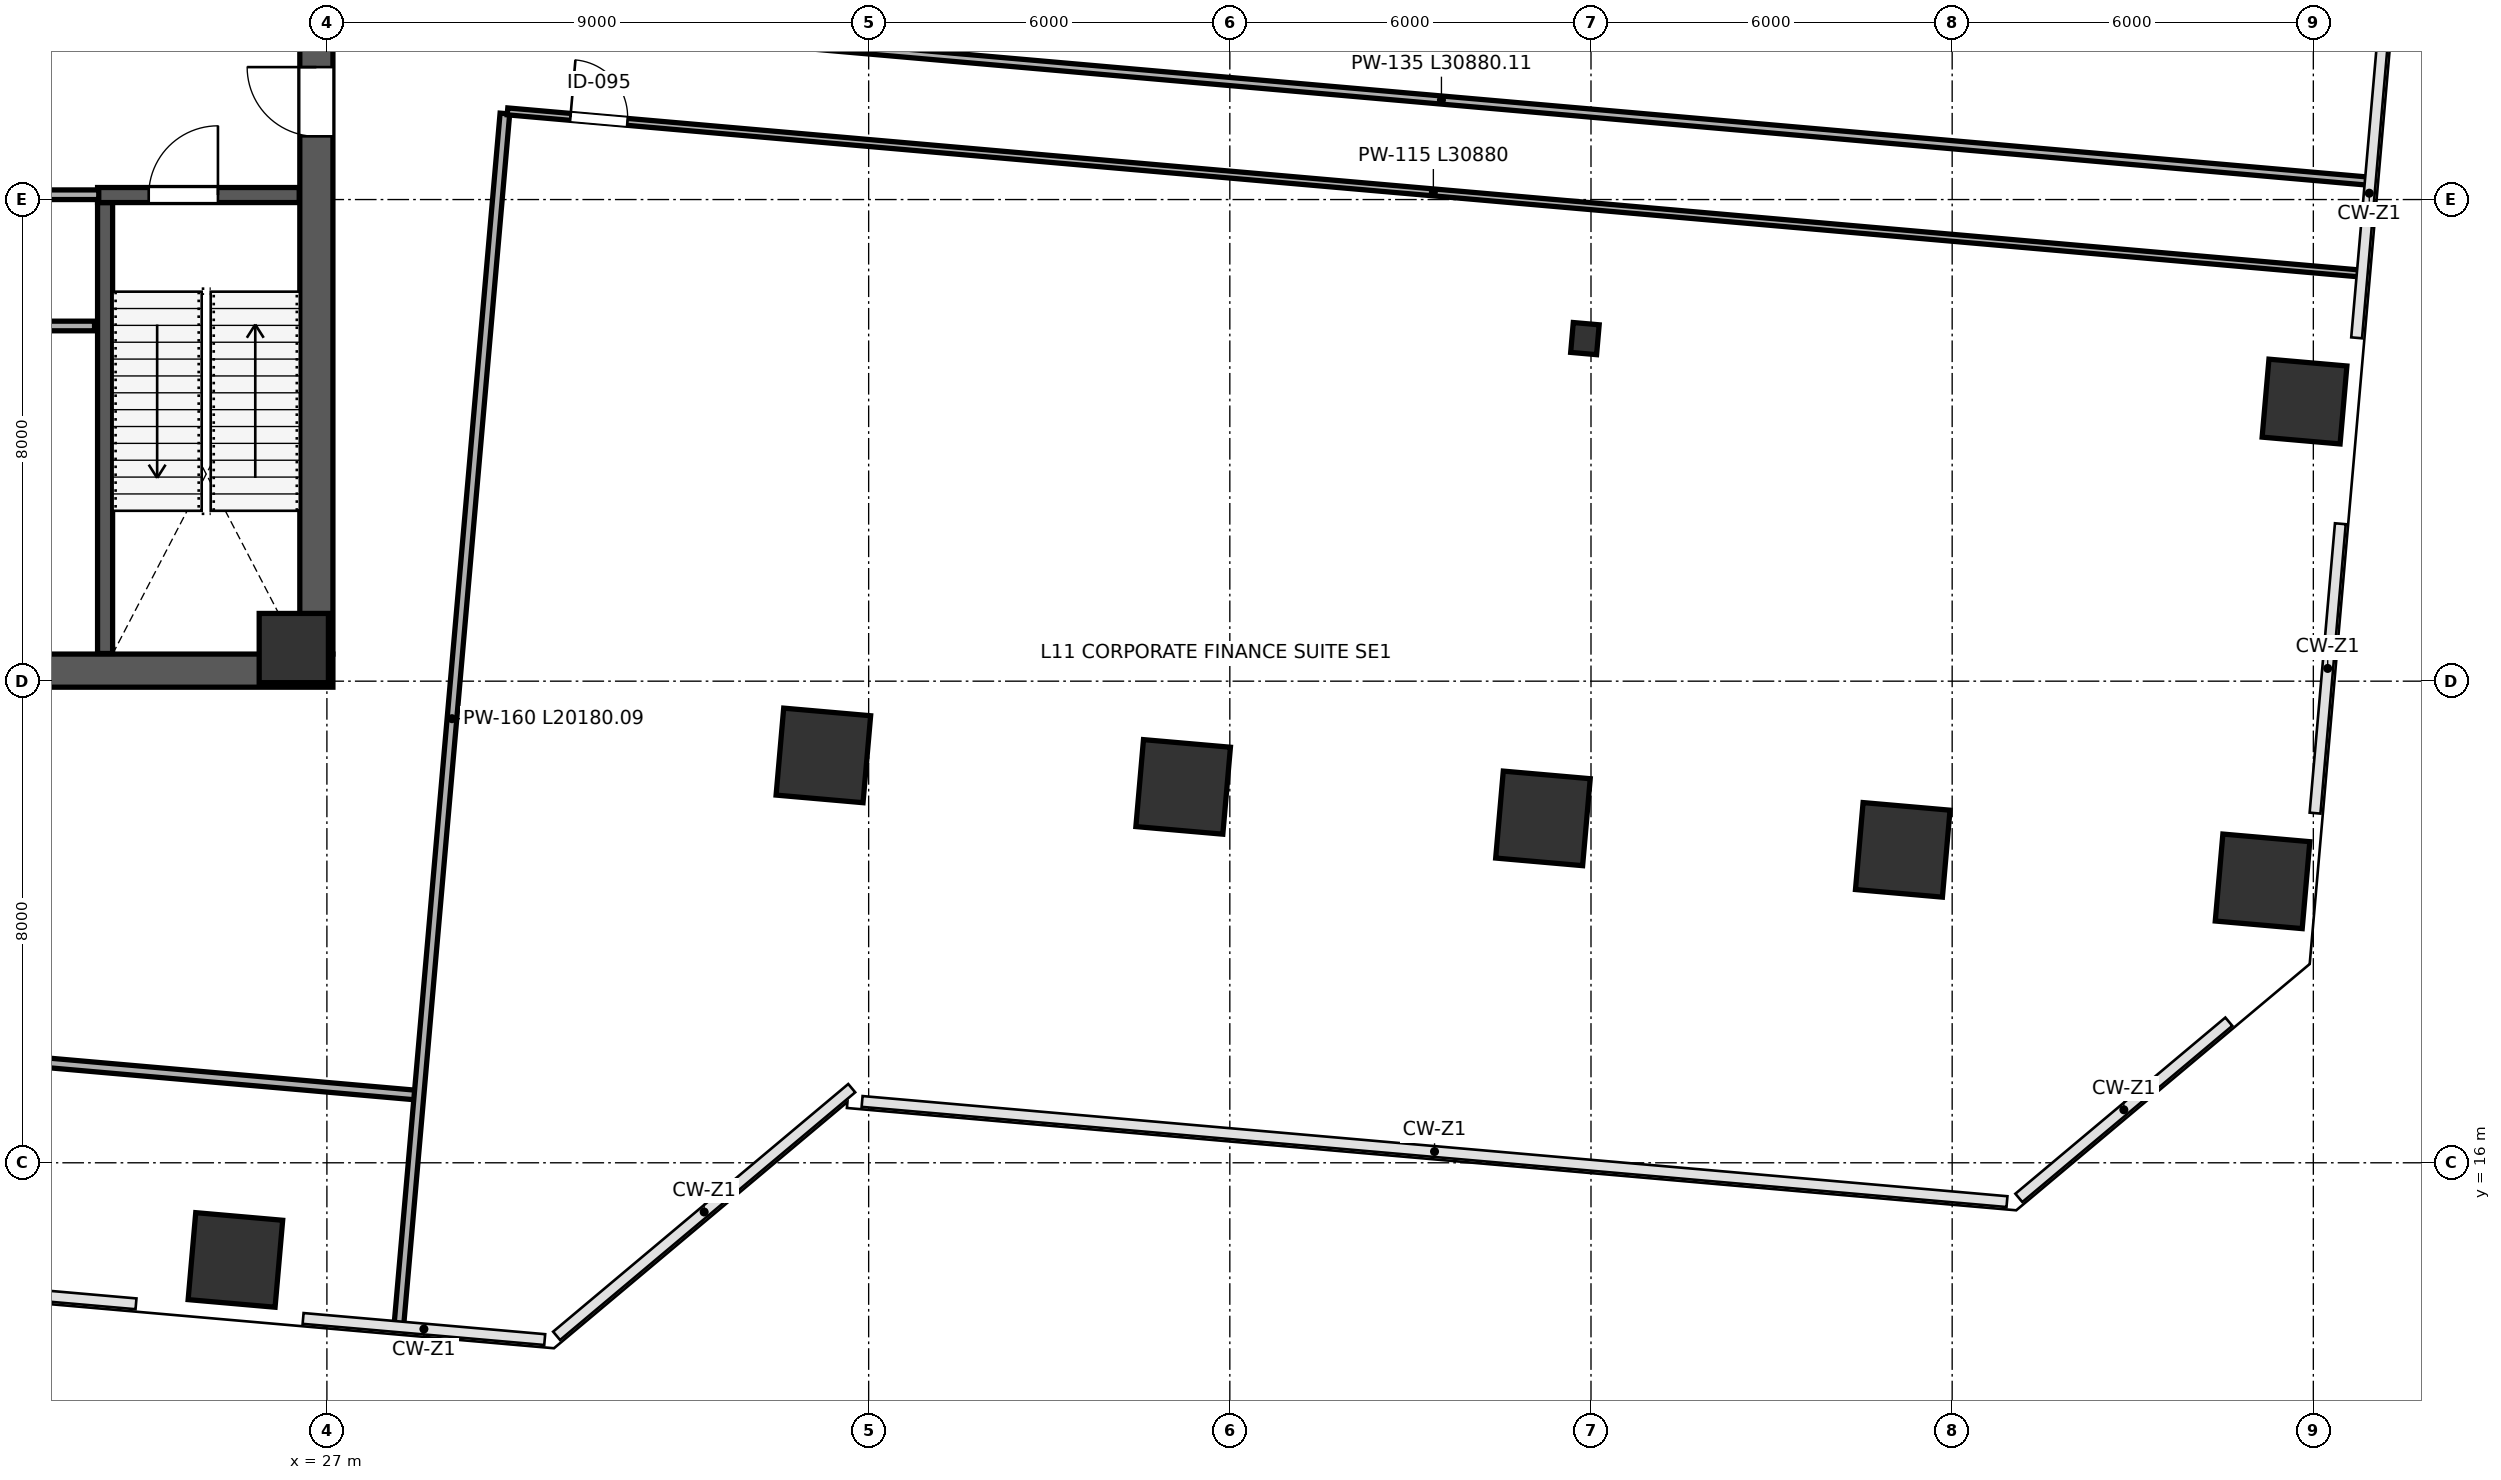
"""IFC4 building model, lengths in metres.
Left out: names, types, materials, properties, quantities, classifications, styles, units other than length and angle.
Written with IfcOpenShell. Run it as: python <this file> out.ifc"""

import sys

from ifc_helpers import new_model, si_unit, direction, frame, frame_2d, origin, origin_2d, place, context, subcontext, project, spatial, rectangle, i_section, extrude, clip, halfspace, source, transform, mapped, element, fill, save


model = new_model("IFC4")
c1 = context("Model", 3, precision=1e-05, world=origin(), true_north=direction((0.0, 1.0)))
c2 = subcontext(c1, "Body", "Model", "MODEL_VIEW")
j1 = project(units=[si_unit("LENGTHUNIT", "METRE"), si_unit("PLANEANGLEUNIT", "RADIAN")], contexts=[c1])
p1 = place(None, origin())
s1 = spatial("IfcSite", under=j1, at=p1, CompositionType="ELEMENT")
p2 = place(p1, origin())
s2 = spatial("IfcBuilding", under=s1, at=p2, CompositionType="ELEMENT")
p3 = place(p2, frame((0.0, 0.0, 52.0)))
s3 = spatial("IfcBuildingStorey", under=s2, at=p3, CompositionType="ELEMENT", Elevation=52.0)
m1 = source(origin(), c2, "Body", "SweptSolid", [
    extrude(rectangle(XDim=1.15, YDim=1.15, at=origin_2d()), origin(), (0.0, 0.0, 1.0), 4.799),
])
p4 = place(p3, frame((26.45, 24.55, 0.001), z_axis=(0.0, 0.0, 1.0), x_axis=(1.0, 0.0, 0.0)))
e1 = element("IfcColumn", 1, at=p4, inside=s3, PredefinedType="COLUMN", context=c2, shape_type="MappedRepresentation", body=[
    mapped(m1, transform((0.0, 0.0, 0.0), scale=1.0)),
])
p5 = place(p3, frame((25.48, 14.386, 0.0), z_axis=(-0.079991404188, -0.017133773521, 0.996648287542), x_axis=(-0.123710418219, 0.992292747991, 0.007129846339)))
e2 = element("IfcColumn", 2, at=p5, inside=s3, PredefinedType="COLUMN", context=c2, shape_type="Clipping", body=[
    clip(clip(extrude(rectangle(XDim=1.45, YDim=1.45, at=origin_2d()), origin(), (0.0, 0.0, 1.0), 4.816), halfspace(frame((0.0, 0.0, 0.065), z_axis=(0.0, 0.0, -1.0), x_axis=(1.0, 0.0, 0.0)), False)), halfspace(frame((0.0, 0.0, 4.751), z_axis=(0.0, 0.0, 1.0), x_axis=(1.0, 0.0, 0.0)), False)),
])
p6 = place(p3, frame((35.248, 22.767, 0.0), z_axis=(-0.04250232201, -0.061826170084, 0.997181566876), x_axis=(-0.771691261686, 0.635963708591, 0.006538959538)))
e3 = element("IfcColumn", 3, at=p6, inside=s3, PredefinedType="COLUMN", context=c2, shape_type="Clipping", body=[
    clip(clip(extrude(rectangle(XDim=1.45, YDim=1.45, at=origin_2d()), origin(), (0.0, 0.0, 1.0), 4.814), halfspace(frame((0.0, 0.0, 0.06), z_axis=(0.0, 0.0, -1.0), x_axis=(1.0, 0.0, 0.0)), False)), halfspace(frame((0.0, 0.0, 4.754), z_axis=(0.0, 0.0, 1.0), x_axis=(1.0, 0.0, 0.0)), False)),
])
p7 = place(p3, frame((41.225, 22.244, 0.0), z_axis=(-0.045093362177, -0.088668429331, 0.995039948106), x_axis=(-0.848649441646, 0.528884635569, 0.008669916536)))
e4 = element("IfcColumn", 4, at=p7, inside=s3, PredefinedType="COLUMN", context=c2, shape_type="Clipping", body=[
    clip(clip(extrude(rectangle(XDim=1.45, YDim=1.45, at=origin_2d()), origin(), (0.0, 0.0, 1.0), 4.824), halfspace(frame((0.0, 0.0, 0.079), z_axis=(0.0, 0.0, -1.0), x_axis=(1.0, 0.0, 0.0)), False)), halfspace(frame((0.0, 0.0, 4.745), z_axis=(0.0, 0.0, 1.0), x_axis=(1.0, 0.0, 0.0)), False)),
])
p8 = place(p3, frame((47.202, 21.721, 0.0), z_axis=(-0.047588043547, -0.115361895597, 0.992182952462), x_axis=(-0.88794115684, 0.459828454583, 0.010876320445)))
e5 = element("IfcColumn", 5, at=p8, inside=s3, PredefinedType="COLUMN", context=c2, shape_type="Clipping", body=[
    clip(clip(extrude(rectangle(XDim=1.45, YDim=1.45, at=origin_2d()), origin(), (0.0, 0.0, 1.0), 4.838), halfspace(frame((0.0, 0.0, 0.1), z_axis=(0.0, 0.0, -1.0), x_axis=(1.0, 0.0, 0.0)), False)), halfspace(frame((0.0, 0.0, 4.738), z_axis=(0.0, 0.0, 1.0), x_axis=(1.0, 0.0, 0.0)), False)),
])
p9 = place(p3, frame((47.899, 29.69, 0.0), z_axis=(-0.011715316222, -0.119021553168, 0.992822552749), x_axis=(-0.982927442212, 0.183698103187, 0.010423542171)))
e6 = element("IfcColumn", 6, at=p9, inside=s3, PredefinedType="COLUMN", context=c2, shape_type="Clipping", body=[
    clip(clip(extrude(i_section(OverallWidth=0.432, OverallDepth=0.498, WebThickness=0.056, FlangeThickness=0.089, FilletRadius=0.015, at=origin_2d()), origin(), (0.0, 0.0, 1.0), 4.835), halfspace(frame((0.0, 0.0, 0.033), z_axis=(0.0, 0.0, -1.0), x_axis=(1.0, 0.0, 0.0)), False)), halfspace(frame((0.0, 0.0, 4.802), z_axis=(0.0, 0.0, 1.0), x_axis=(1.0, 0.0, 0.0)), False)),
])
p10 = place(p3, frame((53.179, 21.198, 0.0), z_axis=(-0.050132710285, -0.14179964193, 0.98862509219), x_axis=(-0.910502595793, 0.413295530458, 0.013108301098)))
e7 = element("IfcColumn", 7, at=p10, inside=s3, PredefinedType="COLUMN", context=c2, shape_type="Clipping", body=[
    clip(clip(extrude(rectangle(XDim=1.45, YDim=1.45, at=origin_2d()), origin(), (0.0, 0.0, 1.0), 4.855), halfspace(frame((0.0, 0.0, 0.12), z_axis=(0.0, 0.0, -1.0), x_axis=(1.0, 0.0, 0.0)), False)), halfspace(frame((0.0, 0.0, 4.735), z_axis=(0.0, 0.0, 1.0), x_axis=(1.0, 0.0, 0.0)), False)),
])
p11 = place(p3, frame((59.156, 20.675, 0.0), z_axis=(-0.052522404047, -0.167881430668, 0.984407040969), x_axis=(-0.925134544634, 0.379329710363, 0.015331182622)))
e8 = element("IfcColumn", 8, at=p11, inside=s3, PredefinedType="COLUMN", context=c2, shape_type="Clipping", body=[
    clip(clip(extrude(rectangle(XDim=1.45, YDim=1.45, at=origin_2d()), origin(), (0.0, 0.0, 1.0), 4.876), halfspace(frame((0.0, 0.0, 0.141), z_axis=(0.0, 0.0, -1.0), x_axis=(1.0, 0.0, 0.0)), False)), halfspace(frame((0.0, 0.0, 4.735), z_axis=(0.0, 0.0, 1.0), x_axis=(1.0, 0.0, 0.0)), False)),
])
p12 = place(p3, frame((59.854, 28.645, 0.0), z_axis=(-0.01688396532, -0.171545095717, 0.985031579113), x_axis=(-0.982995282805, 0.183015223344, 0.015023382047)))
e9 = element("IfcColumn", 9, at=p12, inside=s3, PredefinedType="COLUMN", context=c2, shape_type="Clipping", body=[
    clip(clip(extrude(rectangle(XDim=1.3, YDim=1.3, at=origin_2d()), origin(), (0.0, 0.0, 1.0), 4.873), halfspace(frame((0.0, 0.0, 0.124), z_axis=(0.0, 0.0, -1.0), x_axis=(1.0, 0.0, 0.0)), False)), halfspace(frame((0.0, 0.0, 4.749), z_axis=(0.0, 0.0, 1.0), x_axis=(1.0, 0.0, 0.0)), False)),
])
p13 = place(p3, frame((26.825, 24.45, 0.0), z_axis=(0.0, 0.0, 1.0), x_axis=(0.0, 1.0, 0.0)))
e10 = element("IfcWall", 10, at=p13, inside=s3, PredefinedType="SHEAR", context=c2, shape_type="SweptSolid", body=[
    extrude(rectangle(XDim=15.1, YDim=0.55, at=frame_2d((7.55, 0.0))), origin(), (0.0, 0.0, 1.0), 4.56),
])
p14 = place(p13, frame((8.6, 0.0, 0.0)))
e11 = element("IfcOpeningElement", 11, at=p14, cuts=e10, PredefinedType="OPENING", context=c2, shape_type="SweptSolid", body=[
    extrude(rectangle(XDim=1.15, YDim=2.2, at=frame_2d((0.575, 1.1))), frame((0.0, 0.285, 0.0), z_axis=(0.0, -1.0, 0.0), x_axis=(1.0, 0.0, 0.0)), (0.0, 0.0, 1.0), 0.57),
])
p15 = place(p3, frame((8.9, 24.175, 0.0), z_axis=(0.0, 0.0, 1.0), x_axis=(1.0, 0.0, 0.0)))
e12 = element("IfcWall", 12, at=p15, inside=s3, PredefinedType="SHEAR", context=c2, shape_type="SweptSolid", body=[
    extrude(rectangle(XDim=18.2, YDim=0.55, at=frame_2d((9.1, 0.0))), origin(), (0.0, 0.0, 1.0), 4.56),
])
p16 = place(p3, frame((23.315, 24.46, 0.0), z_axis=(0.0, 0.0, 1.0), x_axis=(0.0, 1.0, 0.0)))
e13 = element("IfcWall", 13, at=p16, inside=s3, PredefinedType="SHEAR", context=c2, shape_type="SweptSolid", body=[
    extrude(rectangle(XDim=7.49, YDim=0.25, at=frame_2d((3.745, 0.0))), origin(), (0.0, 0.0, 1.0), 4.56),
])
p17 = place(p3, frame((23.19, 32.075, 0.0), z_axis=(0.0, 0.0, 1.0), x_axis=(1.0, 0.0, 0.0)))
e14 = element("IfcWall", 14, at=p17, inside=s3, PredefinedType="SHEAR", context=c2, shape_type="SweptSolid", body=[
    extrude(rectangle(XDim=3.35, YDim=0.25, at=frame_2d((1.675, 0.0))), origin(), (0.0, 0.0, 1.0), 4.56),
])
p18 = place(p17, frame((0.85, 0.0, 0.0)))
e15 = element("IfcOpeningElement", 15, at=p18, cuts=e14, PredefinedType="OPENING", context=c2, shape_type="SweptSolid", body=[
    extrude(rectangle(XDim=1.15, YDim=2.2, at=frame_2d((0.575, 1.1))), frame((0.0, 0.135, 0.0), z_axis=(0.0, -1.0, 0.0), x_axis=(1.0, 0.0, 0.0)), (0.0, 0.0, 1.0), 0.27),
])
p19 = place(p3, frame((19.39, 32.08, 0.0), z_axis=(0.0, 0.0, 1.0), x_axis=(1.0, 0.0, 0.0)))
e16 = element("IfcWall", 16, at=p19, inside=s3, PredefinedType="PARTITIONING", context=c2, shape_type="SweptSolid", body=[
    extrude(rectangle(XDim=3.82, YDim=0.16, at=frame_2d((1.91, 0.0))), origin(), (0.0, 0.0, 1.0), 4.56),
])
p20 = place(p3, frame((19.42, 29.9, 0.0), z_axis=(0.0, 0.0, 1.0), x_axis=(1.0, 0.0, 0.0)))
e17 = element("IfcWall", 17, at=p20, inside=s3, PredefinedType="PARTITIONING", context=c2, shape_type="SweptSolid", body=[
    extrude(rectangle(XDim=3.72, YDim=0.16, at=frame_2d((1.86, 0.0))), origin(), (0.0, 0.0, 1.0), 4.56),
])
p21 = place(p3, frame((10.987, 18.656, 0.0), z_axis=(0.0, 0.0, 1.0), x_axis=(0.99619508988, -0.087151264471, 0.0)))
e18 = element("IfcWall", 18, at=p21, inside=s3, PredefinedType="PARTITIONING", context=c2, shape_type="SweptSolid", body=[
    extrude(rectangle(XDim=17.57, YDim=0.16, at=frame_2d((8.785, 0.0))), origin(), (0.0, 0.0, 1.0), 4.56),
])
p22 = place(p21, frame((1.05, 0.0, 0.0)))
e19 = element("IfcOpeningElement", 19, at=p22, cuts=e18, PredefinedType="OPENING", context=c2, shape_type="SweptSolid", body=[
    extrude(rectangle(XDim=0.95, YDim=2.15, at=frame_2d((0.475, 1.075))), frame((0.0, 0.09, 0.0), z_axis=(0.0, -1.0, 0.0), x_axis=(1.0, 0.0, 0.0)), (0.0, 0.0, 1.0), 0.18),
])
p23 = place(p3, frame((28.198, 13.325, 0.0), z_axis=(0.0, 0.0, 1.0), x_axis=(0.087154794008, 0.996194781095, 0.0)))
e20 = element("IfcWall", 20, at=p23, inside=s3, PredefinedType="PARTITIONING", context=c2, shape_type="SweptSolid", body=[
    extrude(rectangle(XDim=20.18, YDim=0.16, at=frame_2d((10.09, 0.0))), origin(), (0.0, 0.0, 1.0), 4.56),
])
p24 = place(p3, frame((30.134, 34.999, 0.0), z_axis=(0.0, 0.0, 1.0), x_axis=(0.996195270611, -0.087149198574, 0.0)))
e21 = element("IfcWall", 21, at=p24, inside=s3, PredefinedType="PARTITIONING", context=c2, shape_type="SweptSolid", body=[
    extrude(rectangle(XDim=30.88, YDim=0.135, at=frame_2d((15.44, 0.0))), origin(), (0.0, 0.0, 1.0), 3.695),
])
p25 = place(p24, frame((1.05, 0.0, 0.0)))
e22 = element("IfcOpeningElement", 22, at=p25, cuts=e21, PredefinedType="OPENING", context=c2, shape_type="SweptSolid", body=[
    extrude(rectangle(XDim=0.95, YDim=2.15, at=frame_2d((0.475, 1.075))), frame((0.0, 0.078, 0.0), z_axis=(0.0, -1.0, 0.0), x_axis=(1.0, 0.0, 0.0)), (0.0, 0.0, 1.0), 0.155),
])
p26 = place(p3, frame((30.0, 33.465, 0.0), z_axis=(0.0, 0.0, 1.0), x_axis=(0.996195270611, -0.087149198574, 0.0)))
e23 = element("IfcWall", 23, at=p26, inside=s3, PredefinedType="PARTITIONING", context=c2, shape_type="SweptSolid", body=[
    extrude(rectangle(XDim=30.88, YDim=0.115, at=frame_2d((15.44, 0.0))), origin(), (0.0, 0.0, 1.0), 3.695),
])
p27 = place(p26, frame((1.05, 0.0, 0.0)))
e24 = element("IfcOpeningElement", 24, at=p27, cuts=e23, PredefinedType="OPENING", context=c2, shape_type="SweptSolid", body=[
    extrude(rectangle(XDim=0.95, YDim=2.15, at=frame_2d((0.475, 1.075))), frame((0.0, 0.067, 0.0), z_axis=(0.0, -1.0, 0.0), x_axis=(1.0, 0.0, 0.0)), (0.0, 0.0, 1.0), 0.135),
])
m2 = source(origin(), c2, "Body", "SweptSolid", [
    extrude(rectangle(XDim=1.15, YDim=2.2, at=frame_2d((0.575, 1.1))), frame((0.0, 0.025, 0.0), z_axis=(0.0, -1.0, 0.0), x_axis=(1.0, 0.0, 0.0)), (0.0, 0.0, 1.0), 0.05),
])
p28 = place(p18, origin())
e25 = element("IfcDoor", 25, at=p28, inside=s3, OperationType="SINGLE_SWING_RIGHT", PredefinedType="DOOR", context=c2, shape_type="MappedRepresentation", body=[
    mapped(m2, transform((0.0, 0.0, 0.0), scale=1.0)),
])
fill(e15, e25)
m3 = source(origin(), c2, "Body", "SweptSolid", [
    extrude(rectangle(XDim=1.15, YDim=2.2, at=frame_2d((0.575, 1.1))), frame((0.0, 0.025, 0.0), z_axis=(0.0, -1.0, 0.0), x_axis=(1.0, 0.0, 0.0)), (0.0, 0.0, 1.0), 0.05),
])
p29 = place(p14, origin())
e26 = element("IfcDoor", 26, at=p29, inside=s3, OperationType="SINGLE_SWING_RIGHT", PredefinedType="DOOR", context=c2, shape_type="MappedRepresentation", body=[
    mapped(m3, transform((0.0, 0.0, 0.0), scale=1.0)),
])
fill(e11, e26)
m4 = source(origin(), c2, "Body", "SweptSolid", [
    extrude(rectangle(XDim=0.95, YDim=2.15, at=frame_2d((0.475, 1.075))), frame((0.0, 0.025, 0.0), z_axis=(0.0, -1.0, 0.0), x_axis=(1.0, 0.0, 0.0)), (0.0, 0.0, 1.0), 0.05),
])
p30 = place(p27, origin())
e27 = element("IfcDoor", 27, at=p30, inside=s3, OperationType="SINGLE_SWING_LEFT", PredefinedType="DOOR", context=c2, shape_type="MappedRepresentation", body=[
    mapped(m4, transform((0.0, 0.0, 0.0), scale=1.0)),
])
fill(e24, e27)
save(model, sys.argv[1])
